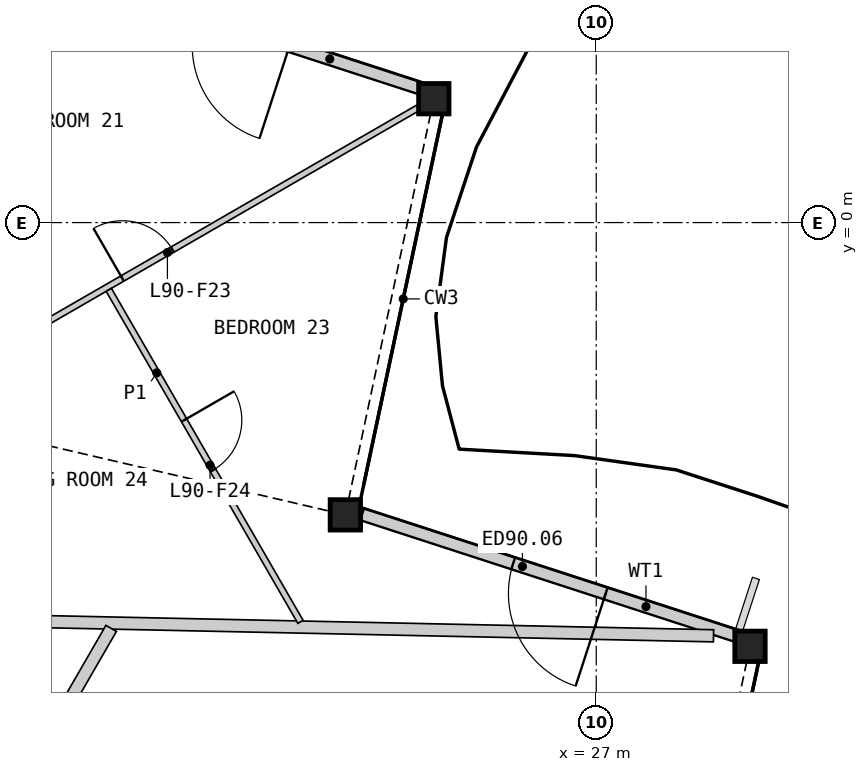
"""IFC4 building model, lengths in metres.
Left out: names, types, materials, properties, quantities, classifications, styles, units other than length and angle.
Written with IfcOpenShell. Run it as: python <this file> out.ifc"""

import sys

from ifc_helpers import new_model, si_unit, direction, frame, frame_2d, origin, origin_2d, place, context, subcontext, project, spatial, rectangle, hollow_rectangle, extrude, element, fill, save


model = new_model("IFC4")
c1 = context("Model", 3, precision=1e-05, world=origin(), true_north=direction((0.0, 1.0)))
c2 = subcontext(c1, "Body", "Model", "MODEL_VIEW")
j1 = project(units=[si_unit("LENGTHUNIT", "METRE"), si_unit("PLANEANGLEUNIT", "RADIAN")], contexts=[c1])
p1 = place(None, origin())
s1 = spatial("IfcSite", under=j1, at=p1, CompositionType="ELEMENT")
p2 = place(p1, origin())
s2 = spatial("IfcBuilding", under=s1, at=p2, CompositionType="ELEMENT")
p3 = place(p2, frame((0.0, 0.0, 395.0)))
s3 = spatial("IfcBuildingStorey", under=s2, at=p3, CompositionType="ELEMENT", Elevation=395.0)
for number, where, z_axis, x_axis in (
    (1, (29.529, -6.969, 0.0), (0.0, 0.0, 1.0), (1.0, 0.0, 0.0)),
    (2, (22.874, -4.807, 0.0), (0.0, 0.0, 1.0), (1.0, 0.0, 0.0)),
    (3, (24.329, 2.037, 0.0), (0.0, 0.0, 1.0), (1.0, 0.0, 0.0)),
):
    element("IfcColumn", number, at=place(p3, frame(where, z_axis=z_axis, x_axis=x_axis)), inside=s3, PredefinedType="COLUMN", context=c2, shape_type="SweptSolid", body=[
        extrude(hollow_rectangle(XDim=0.5, YDim=0.5, WallThickness=0.03, at=origin_2d()), origin(), (0.0, 0.0, 1.0), 3.4),
    ])
p4 = place(p3, frame((29.374, -6.822, 0.0), z_axis=(0.0, 0.0, 1.0), x_axis=(-0.951061473407, 0.309001737536, 0.0)))
e4 = element("IfcWall", 4, at=p4, inside=s3, PredefinedType="SOLIDWALL", context=c2, shape_type="SweptSolid", body=[
    extrude(rectangle(XDim=6.546, YDim=0.2, at=frame_2d((3.273, 0.0))), origin(), (0.0, 0.0, 1.0), 2.634),
])
p5 = place(p4, frame((2.333, 0.0, 0.0)))
e5 = element("IfcOpeningElement", 5, at=p5, cuts=e4, PredefinedType="OPENING", context=c2, shape_type="SweptSolid", body=[
    extrude(rectangle(XDim=1.6, YDim=2.25, at=frame_2d((0.8, 1.125))), frame((0.0, 0.11, 0.0), z_axis=(0.0, -1.0, 0.0), x_axis=(1.0, 0.0, 0.0)), (0.0, 0.0, 1.0), 0.22),
])
p6 = place(p3, frame((24.174, 2.185, 0.0), z_axis=(0.0, 0.0, 1.0), x_axis=(-0.951061473407, 0.309001737536, 0.0)))
e6 = element("IfcWall", 6, at=p6, inside=s3, PredefinedType="SOLIDWALL", context=c2, shape_type="SweptSolid", body=[
    extrude(rectangle(XDim=6.546, YDim=0.2, at=frame_2d((3.273, 0.0))), origin(), (0.0, 0.0, 1.0), 2.634),
])
p7 = place(p6, frame((2.333, 0.0, 0.0)))
e7 = element("IfcOpeningElement", 7, at=p7, cuts=e6, PredefinedType="OPENING", context=c2, shape_type="SweptSolid", body=[
    extrude(rectangle(XDim=1.6, YDim=2.25, at=frame_2d((0.8, 1.125))), frame((0.0, 0.11, 0.0), z_axis=(0.0, -1.0, 0.0), x_axis=(1.0, 0.0, 0.0)), (0.0, 0.0, 1.0), 0.22),
])
p8 = place(p3, frame((15.294, -6.508, 0.0), z_axis=(0.0, 0.0, 1.0), x_axis=(0.999775726416, -0.02117774467, 0.0)))
e8 = element("IfcWall", 8, at=p8, inside=s3, PredefinedType="PARTITIONING", context=c2, shape_type="SweptSolid", body=[
    extrude(rectangle(XDim=13.638, YDim=0.2, at=frame_2d((6.819, 0.0))), origin(), (0.0, 0.0, 1.0), 2.33),
])
p9 = place(p3, frame((17.271, -9.708, 0.0), z_axis=(0.0, 0.0, 1.0), x_axis=(0.499983843005, 0.866034731829, 0.0)))
e9 = element("IfcWall", 9, at=p9, inside=s3, PredefinedType="PARTITIONING", context=c2, shape_type="SweptSolid", body=[
    extrude(rectangle(XDim=3.503, YDim=0.2, at=frame_2d((1.752, 0.0))), origin(), (0.0, 0.0, 1.0), 2.33),
])
p10 = place(p3, frame((13.865, -4.004, 0.0), z_axis=(0.0, 0.0, 1.0), x_axis=(0.866023404247, 0.500003463284, 0.0)))
e10 = element("IfcWall", 10, at=p10, inside=s3, PredefinedType="PARTITIONING", context=c2, shape_type="SweptSolid", body=[
    extrude(rectangle(XDim=11.782, YDim=0.1, at=frame_2d((5.891, 0.0))), origin(), (0.0, 0.0, 1.0), 2.33),
])
p11 = place(p10, frame((6.168, 0.0, 0.0)))
e11 = element("IfcOpeningElement", 11, at=p11, cuts=e10, PredefinedType="OPENING", context=c2, shape_type="SweptSolid", body=[
    extrude(rectangle(XDim=0.95, YDim=2.1, at=frame_2d((0.475, 1.05))), frame((0.0, 0.06, 0.0), z_axis=(0.0, -1.0, 0.0), x_axis=(1.0, 0.0, 0.0)), (0.0, 0.0, 1.0), 0.12),
])
p12 = place(p3, frame((18.983, -1.107, 0.0), z_axis=(0.0, 0.0, 1.0), x_axis=(0.500016298831, -0.866015993445, 0.0)))
e12 = element("IfcWall", 12, at=p12, inside=s3, PredefinedType="PARTITIONING", context=c2, shape_type="SweptSolid", body=[
    extrude(rectangle(XDim=6.305, YDim=0.1, at=frame_2d((3.152, 0.0))), origin(), (0.0, 0.0, 1.0), 2.33),
])
p13 = place(p12, frame((2.475, 0.0, 0.0)))
e13 = element("IfcOpeningElement", 13, at=p13, cuts=e12, PredefinedType="OPENING", context=c2, shape_type="SweptSolid", body=[
    extrude(rectangle(XDim=0.95, YDim=2.1, at=frame_2d((0.475, 1.05))), frame((0.0, 0.06, 0.0), z_axis=(0.0, -1.0, 0.0), x_axis=(1.0, 0.0, 0.0)), (0.0, 0.0, 1.0), 0.12),
])
p14 = place(p5, origin())
e14 = element("IfcDoor", 14, at=p14, inside=s3, OperationType="DOUBLE_DOOR_SINGLE_SWING", PredefinedType="DOOR", context=c2, shape_type="SweptSolid", body=[
    extrude(rectangle(XDim=1.6, YDim=2.25, at=frame_2d((0.8, 1.125))), frame((0.0, 0.025, 0.0), z_axis=(0.0, -1.0, 0.0), x_axis=(1.0, 0.0, 0.0)), (0.0, 0.0, 1.0), 0.05),
])
fill(e5, e14)
p15 = place(p11, origin())
e15 = element("IfcDoor", 15, at=p15, inside=s3, OperationType="SINGLE_SWING_LEFT", PredefinedType="DOOR", context=c2, shape_type="SweptSolid", body=[
    extrude(rectangle(XDim=0.95, YDim=2.1, at=frame_2d((0.475, 1.05))), frame((0.0, 0.025, 0.0), z_axis=(0.0, -1.0, 0.0), x_axis=(1.0, 0.0, 0.0)), (0.0, 0.0, 1.0), 0.05),
])
fill(e11, e15)
p16 = place(p13, origin())
e16 = element("IfcDoor", 16, at=p16, inside=s3, OperationType="SINGLE_SWING_LEFT", PredefinedType="DOOR", context=c2, shape_type="SweptSolid", body=[
    extrude(rectangle(XDim=0.95, YDim=2.1, at=frame_2d((0.475, 1.05))), frame((0.0, 0.025, 0.0), z_axis=(0.0, -1.0, 0.0), x_axis=(1.0, 0.0, 0.0)), (0.0, 0.0, 1.0), 0.05),
])
fill(e13, e16)
save(model, sys.argv[1])
